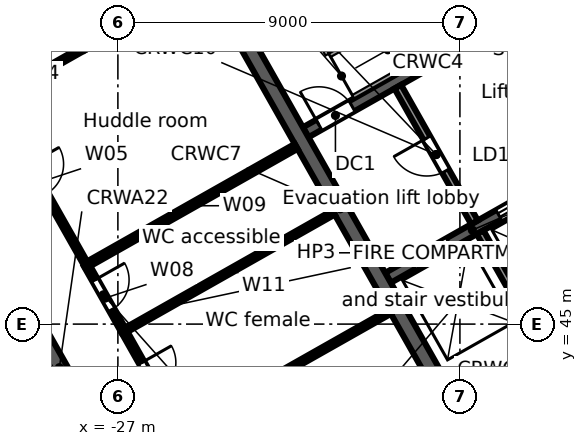
"""IFC4 building model, lengths in metres.
Left out: names, types, materials, properties, quantities, classifications, styles, units other than length and angle.
Written with IfcOpenShell. Run it as: python <this file> out.ifc"""

import sys

from ifc_helpers import new_model, si_unit, direction, frame, frame_2d, origin, place, context, subcontext, project, spatial, rectangle, extrude, element, fill, save


model = new_model("IFC4")
c1 = context("Model", 3, precision=1e-05, world=origin(), true_north=direction((0.0, 1.0)))
c2 = subcontext(c1, "Body", "Model", "MODEL_VIEW")
j1 = project(units=[si_unit("LENGTHUNIT", "METRE"), si_unit("PLANEANGLEUNIT", "RADIAN")], contexts=[c1])
p1 = place(None, origin())
s1 = spatial("IfcSite", under=j1, at=p1, CompositionType="ELEMENT")
p2 = place(p1, origin())
s2 = spatial("IfcBuilding", under=s1, at=p2, CompositionType="ELEMENT")
p3 = place(p2, frame((0.0, 0.0, 281.7)))
s3 = spatial("IfcBuildingStorey", under=s2, at=p3, CompositionType="ELEMENT", Elevation=281.7)
p4 = place(p3, frame((-58.732, 38.771, 0.0), z_axis=(0.0, 0.0, 1.0), x_axis=(0.870355615581, 0.492423702137, 0.0)))
e1 = element("IfcWall", 1, at=p4, inside=s3, PredefinedType="STANDARD", context=c2, shape_type="SweptSolid", body=[
    extrude(rectangle(XDim=64.052, YDim=0.25, at=frame_2d((32.026, 0.0))), origin(), (0.0, 0.0, 1.0), 3.45),
])
p5 = place(p4, frame((61.259, 0.0, 0.8)))
e2 = element("IfcOpeningElement", 2, at=p5, cuts=e1, PredefinedType="OPENING", context=c2, shape_type="SweptSolid", body=[
    extrude(rectangle(XDim=2.4, YDim=2.2, at=frame_2d((1.2, 1.1))), frame((0.0, 0.135, 0.0), z_axis=(0.0, -1.0, 0.0), x_axis=(1.0, 0.0, 0.0)), (0.0, 0.0, 1.0), 0.27),
])
p6 = place(p4, frame((58.216, 0.0, 0.8)))
e3 = element("IfcOpeningElement", 3, at=p6, cuts=e1, PredefinedType="OPENING", context=c2, shape_type="SweptSolid", body=[
    extrude(rectangle(XDim=2.4, YDim=2.2, at=frame_2d((1.2, 1.1))), frame((0.0, 0.135, 0.0), z_axis=(0.0, -1.0, 0.0), x_axis=(1.0, 0.0, 0.0)), (0.0, 0.0, 1.0), 0.27),
])
p7 = place(p4, frame((55.173, 0.0, 0.8)))
e4 = element("IfcOpeningElement", 4, at=p7, cuts=e1, PredefinedType="OPENING", context=c2, shape_type="SweptSolid", body=[
    extrude(rectangle(XDim=2.4, YDim=2.2, at=frame_2d((1.2, 1.1))), frame((0.0, 0.135, 0.0), z_axis=(0.0, -1.0, 0.0), x_axis=(1.0, 0.0, 0.0)), (0.0, 0.0, 1.0), 0.27),
])
p8 = place(p4, frame((52.129, 0.0, 0.8)))
e5 = element("IfcOpeningElement", 5, at=p8, cuts=e1, PredefinedType="OPENING", context=c2, shape_type="SweptSolid", body=[
    extrude(rectangle(XDim=2.4, YDim=2.2, at=frame_2d((1.2, 1.1))), frame((0.0, 0.135, 0.0), z_axis=(0.0, -1.0, 0.0), x_axis=(1.0, 0.0, 0.0)), (0.0, 0.0, 1.0), 0.27),
])
p9 = place(p4, frame((49.086, 0.0, 0.8)))
e6 = element("IfcOpeningElement", 6, at=p9, cuts=e1, PredefinedType="OPENING", context=c2, shape_type="SweptSolid", body=[
    extrude(rectangle(XDim=2.4, YDim=2.2, at=frame_2d((1.2, 1.1))), frame((0.0, 0.135, 0.0), z_axis=(0.0, -1.0, 0.0), x_axis=(1.0, 0.0, 0.0)), (0.0, 0.0, 1.0), 0.27),
])
p10 = place(p4, frame((46.043, 0.0, 0.8)))
e7 = element("IfcOpeningElement", 7, at=p10, cuts=e1, PredefinedType="OPENING", context=c2, shape_type="SweptSolid", body=[
    extrude(rectangle(XDim=2.4, YDim=2.2, at=frame_2d((1.2, 1.1))), frame((0.0, 0.135, 0.0), z_axis=(0.0, -1.0, 0.0), x_axis=(1.0, 0.0, 0.0)), (0.0, 0.0, 1.0), 0.27),
])
p11 = place(p4, frame((43.0, 0.0, 0.8)))
e8 = element("IfcOpeningElement", 8, at=p11, cuts=e1, PredefinedType="OPENING", context=c2, shape_type="SweptSolid", body=[
    extrude(rectangle(XDim=2.4, YDim=2.2, at=frame_2d((1.2, 1.1))), frame((0.0, 0.135, 0.0), z_axis=(0.0, -1.0, 0.0), x_axis=(1.0, 0.0, 0.0)), (0.0, 0.0, 1.0), 0.27),
])
p12 = place(p4, frame((39.956, 0.0, 0.8)))
e9 = element("IfcOpeningElement", 9, at=p12, cuts=e1, PredefinedType="OPENING", context=c2, shape_type="SweptSolid", body=[
    extrude(rectangle(XDim=2.4, YDim=2.2, at=frame_2d((1.2, 1.1))), frame((0.0, 0.135, 0.0), z_axis=(0.0, -1.0, 0.0), x_axis=(1.0, 0.0, 0.0)), (0.0, 0.0, 1.0), 0.27),
])
p13 = place(p4, frame((36.913, 0.0, 0.8)))
e10 = element("IfcOpeningElement", 10, at=p13, cuts=e1, PredefinedType="OPENING", context=c2, shape_type="SweptSolid", body=[
    extrude(rectangle(XDim=2.4, YDim=2.2, at=frame_2d((1.2, 1.1))), frame((0.0, 0.135, 0.0), z_axis=(0.0, -1.0, 0.0), x_axis=(1.0, 0.0, 0.0)), (0.0, 0.0, 1.0), 0.27),
])
p14 = place(p4, frame((33.87, 0.0, 0.8)))
e11 = element("IfcOpeningElement", 11, at=p14, cuts=e1, PredefinedType="OPENING", context=c2, shape_type="SweptSolid", body=[
    extrude(rectangle(XDim=2.4, YDim=2.2, at=frame_2d((1.2, 1.1))), frame((0.0, 0.135, 0.0), z_axis=(0.0, -1.0, 0.0), x_axis=(1.0, 0.0, 0.0)), (0.0, 0.0, 1.0), 0.27),
])
p15 = place(p4, frame((30.826, 0.0, 0.8)))
e12 = element("IfcOpeningElement", 12, at=p15, cuts=e1, PredefinedType="OPENING", context=c2, shape_type="SweptSolid", body=[
    extrude(rectangle(XDim=2.4, YDim=2.2, at=frame_2d((1.2, 1.1))), frame((0.0, 0.135, 0.0), z_axis=(0.0, -1.0, 0.0), x_axis=(1.0, 0.0, 0.0)), (0.0, 0.0, 1.0), 0.27),
])
p16 = place(p4, frame((27.783, 0.0, 0.8)))
e13 = element("IfcOpeningElement", 13, at=p16, cuts=e1, PredefinedType="OPENING", context=c2, shape_type="SweptSolid", body=[
    extrude(rectangle(XDim=2.4, YDim=2.2, at=frame_2d((1.2, 1.1))), frame((0.0, 0.135, 0.0), z_axis=(0.0, -1.0, 0.0), x_axis=(1.0, 0.0, 0.0)), (0.0, 0.0, 1.0), 0.27),
])
p17 = place(p4, frame((24.74, 0.0, 0.8)))
e14 = element("IfcOpeningElement", 14, at=p17, cuts=e1, PredefinedType="OPENING", context=c2, shape_type="SweptSolid", body=[
    extrude(rectangle(XDim=2.4, YDim=2.2, at=frame_2d((1.2, 1.1))), frame((0.0, 0.135, 0.0), z_axis=(0.0, -1.0, 0.0), x_axis=(1.0, 0.0, 0.0)), (0.0, 0.0, 1.0), 0.27),
])
p18 = place(p4, frame((21.696, 0.0, 0.8)))
e15 = element("IfcOpeningElement", 15, at=p18, cuts=e1, PredefinedType="OPENING", context=c2, shape_type="SweptSolid", body=[
    extrude(rectangle(XDim=2.4, YDim=2.2, at=frame_2d((1.2, 1.1))), frame((0.0, 0.135, 0.0), z_axis=(0.0, -1.0, 0.0), x_axis=(1.0, 0.0, 0.0)), (0.0, 0.0, 1.0), 0.27),
])
p19 = place(p4, frame((18.653, 0.0, 0.8)))
e16 = element("IfcOpeningElement", 16, at=p19, cuts=e1, PredefinedType="OPENING", context=c2, shape_type="SweptSolid", body=[
    extrude(rectangle(XDim=2.4, YDim=2.2, at=frame_2d((1.2, 1.1))), frame((0.0, 0.135, 0.0), z_axis=(0.0, -1.0, 0.0), x_axis=(1.0, 0.0, 0.0)), (0.0, 0.0, 1.0), 0.27),
])
p20 = place(p4, frame((15.61, 0.0, 0.8)))
e17 = element("IfcOpeningElement", 17, at=p20, cuts=e1, PredefinedType="OPENING", context=c2, shape_type="SweptSolid", body=[
    extrude(rectangle(XDim=2.4, YDim=2.2, at=frame_2d((1.2, 1.1))), frame((0.0, 0.135, 0.0), z_axis=(0.0, -1.0, 0.0), x_axis=(1.0, 0.0, 0.0)), (0.0, 0.0, 1.0), 0.27),
])
p21 = place(p4, frame((12.567, 0.0, 0.8)))
e18 = element("IfcOpeningElement", 18, at=p21, cuts=e1, PredefinedType="OPENING", context=c2, shape_type="SweptSolid", body=[
    extrude(rectangle(XDim=2.4, YDim=2.2, at=frame_2d((1.2, 1.1))), frame((0.0, 0.135, 0.0), z_axis=(0.0, -1.0, 0.0), x_axis=(1.0, 0.0, 0.0)), (0.0, 0.0, 1.0), 0.27),
])
p22 = place(p4, frame((9.523, 0.0, 0.8)))
e19 = element("IfcOpeningElement", 19, at=p22, cuts=e1, PredefinedType="OPENING", context=c2, shape_type="SweptSolid", body=[
    extrude(rectangle(XDim=2.4, YDim=2.2, at=frame_2d((1.2, 1.1))), frame((0.0, 0.135, 0.0), z_axis=(0.0, -1.0, 0.0), x_axis=(1.0, 0.0, 0.0)), (0.0, 0.0, 1.0), 0.27),
])
p23 = place(p4, frame((6.48, 0.0, 0.8)))
e20 = element("IfcOpeningElement", 20, at=p23, cuts=e1, PredefinedType="OPENING", context=c2, shape_type="SweptSolid", body=[
    extrude(rectangle(XDim=2.4, YDim=2.2, at=frame_2d((1.2, 1.1))), frame((0.0, 0.135, 0.0), z_axis=(0.0, -1.0, 0.0), x_axis=(1.0, 0.0, 0.0)), (0.0, 0.0, 1.0), 0.27),
])
p24 = place(p4, frame((3.437, 0.0, 0.8)))
e21 = element("IfcOpeningElement", 21, at=p24, cuts=e1, PredefinedType="OPENING", context=c2, shape_type="SweptSolid", body=[
    extrude(rectangle(XDim=2.4, YDim=2.2, at=frame_2d((1.2, 1.1))), frame((0.0, 0.135, 0.0), z_axis=(0.0, -1.0, 0.0), x_axis=(1.0, 0.0, 0.0)), (0.0, 0.0, 1.0), 0.27),
])
p25 = place(p4, frame((0.393, 0.0, 0.8)))
e22 = element("IfcOpeningElement", 22, at=p25, cuts=e1, PredefinedType="OPENING", context=c2, shape_type="SweptSolid", body=[
    extrude(rectangle(XDim=2.4, YDim=2.2, at=frame_2d((1.2, 1.1))), frame((0.0, 0.135, 0.0), z_axis=(0.0, -1.0, 0.0), x_axis=(1.0, 0.0, 0.0)), (0.0, 0.0, 1.0), 0.27),
])
p26 = place(p3, frame((-3.017, 46.293, 0.0), z_axis=(0.0, 0.0, 1.0), x_axis=(-0.870355474887, -0.492423950812, 0.0)))
e23 = element("IfcWall", 23, at=p26, inside=s3, PredefinedType="STANDARD", context=c2, shape_type="SweptSolid", body=[
    extrude(rectangle(XDim=40.34, YDim=0.25, at=frame_2d((20.17, 0.0))), origin(), (0.0, 0.0, 1.0), 3.45),
])
p27 = place(p26, frame((37.428, 0.0, 0.8)))
e24 = element("IfcOpeningElement", 24, at=p27, cuts=e23, PredefinedType="OPENING", context=c2, shape_type="SweptSolid", body=[
    extrude(rectangle(XDim=2.4, YDim=2.2, at=frame_2d((1.2, 1.1))), frame((0.0, 0.135, 0.0), z_axis=(0.0, -1.0, 0.0), x_axis=(1.0, 0.0, 0.0)), (0.0, 0.0, 1.0), 0.27),
])
p28 = place(p26, frame((34.372, 0.0, 0.0)))
e25 = element("IfcOpeningElement", 25, at=p28, cuts=e23, PredefinedType="OPENING", context=c2, shape_type="SweptSolid", body=[
    extrude(rectangle(XDim=1.8, YDim=2.4, at=frame_2d((0.9, 1.2))), frame((0.0, 0.135, 0.0), z_axis=(0.0, -1.0, 0.0), x_axis=(1.0, 0.0, 0.0)), (0.0, 0.0, 1.0), 0.27),
])
p29 = place(p26, frame((30.716, 0.0, 0.8)))
e26 = element("IfcOpeningElement", 26, at=p29, cuts=e23, PredefinedType="OPENING", context=c2, shape_type="SweptSolid", body=[
    extrude(rectangle(XDim=2.4, YDim=2.2, at=frame_2d((1.2, 1.1))), frame((0.0, 0.135, 0.0), z_axis=(0.0, -1.0, 0.0), x_axis=(1.0, 0.0, 0.0)), (0.0, 0.0, 1.0), 0.27),
])
p30 = place(p26, frame((27.36, 0.0, 0.8)))
e27 = element("IfcOpeningElement", 27, at=p30, cuts=e23, PredefinedType="OPENING", context=c2, shape_type="SweptSolid", body=[
    extrude(rectangle(XDim=2.4, YDim=2.2, at=frame_2d((1.2, 1.1))), frame((0.0, 0.135, 0.0), z_axis=(0.0, -1.0, 0.0), x_axis=(1.0, 0.0, 0.0)), (0.0, 0.0, 1.0), 0.27),
])
p31 = place(p26, frame((24.304, 0.0, 0.0)))
e28 = element("IfcOpeningElement", 28, at=p31, cuts=e23, PredefinedType="OPENING", context=c2, shape_type="SweptSolid", body=[
    extrude(rectangle(XDim=1.8, YDim=2.4, at=frame_2d((0.9, 1.2))), frame((0.0, 0.135, 0.0), z_axis=(0.0, -1.0, 0.0), x_axis=(1.0, 0.0, 0.0)), (0.0, 0.0, 1.0), 0.27),
])
p32 = place(p26, frame((20.648, 0.0, 0.8)))
e29 = element("IfcOpeningElement", 29, at=p32, cuts=e23, PredefinedType="OPENING", context=c2, shape_type="SweptSolid", body=[
    extrude(rectangle(XDim=2.4, YDim=2.2, at=frame_2d((1.2, 1.1))), frame((0.0, 0.135, 0.0), z_axis=(0.0, -1.0, 0.0), x_axis=(1.0, 0.0, 0.0)), (0.0, 0.0, 1.0), 0.27),
])
p33 = place(p26, frame((17.292, 0.0, 0.8)))
e30 = element("IfcOpeningElement", 30, at=p33, cuts=e23, PredefinedType="OPENING", context=c2, shape_type="SweptSolid", body=[
    extrude(rectangle(XDim=2.4, YDim=2.2, at=frame_2d((1.2, 1.1))), frame((0.0, 0.135, 0.0), z_axis=(0.0, -1.0, 0.0), x_axis=(1.0, 0.0, 0.0)), (0.0, 0.0, 1.0), 0.27),
])
p34 = place(p26, frame((14.236, 0.0, 0.0)))
e31 = element("IfcOpeningElement", 31, at=p34, cuts=e23, PredefinedType="OPENING", context=c2, shape_type="SweptSolid", body=[
    extrude(rectangle(XDim=1.8, YDim=2.4, at=frame_2d((0.9, 1.2))), frame((0.0, 0.135, 0.0), z_axis=(0.0, -1.0, 0.0), x_axis=(1.0, 0.0, 0.0)), (0.0, 0.0, 1.0), 0.27),
])
p35 = place(p26, frame((10.58, 0.0, 0.8)))
e32 = element("IfcOpeningElement", 32, at=p35, cuts=e23, PredefinedType="OPENING", context=c2, shape_type="SweptSolid", body=[
    extrude(rectangle(XDim=2.4, YDim=2.2, at=frame_2d((1.2, 1.1))), frame((0.0, 0.135, 0.0), z_axis=(0.0, -1.0, 0.0), x_axis=(1.0, 0.0, 0.0)), (0.0, 0.0, 1.0), 0.27),
])
p36 = place(p26, frame((7.224, 0.0, 0.8)))
e33 = element("IfcOpeningElement", 33, at=p36, cuts=e23, PredefinedType="OPENING", context=c2, shape_type="SweptSolid", body=[
    extrude(rectangle(XDim=2.4, YDim=2.2, at=frame_2d((1.2, 1.1))), frame((0.0, 0.135, 0.0), z_axis=(0.0, -1.0, 0.0), x_axis=(1.0, 0.0, 0.0)), (0.0, 0.0, 1.0), 0.27),
])
p37 = place(p26, frame((4.168, 0.0, 0.0)))
e34 = element("IfcOpeningElement", 34, at=p37, cuts=e23, PredefinedType="OPENING", context=c2, shape_type="SweptSolid", body=[
    extrude(rectangle(XDim=1.8, YDim=2.4, at=frame_2d((0.9, 1.2))), frame((0.0, 0.135, 0.0), z_axis=(0.0, -1.0, 0.0), x_axis=(1.0, 0.0, 0.0)), (0.0, 0.0, 1.0), 0.27),
])
p38 = place(p26, frame((0.512, 0.0, 0.8)))
e35 = element("IfcOpeningElement", 35, at=p38, cuts=e23, PredefinedType="OPENING", context=c2, shape_type="SweptSolid", body=[
    extrude(rectangle(XDim=2.4, YDim=2.2, at=frame_2d((1.2, 1.1))), frame((0.0, 0.135, 0.0), z_axis=(0.0, -1.0, 0.0), x_axis=(1.0, 0.0, 0.0)), (0.0, 0.0, 1.0), 0.27),
])
p39 = place(p3, frame((-31.79, 49.597, 0.0), z_axis=(0.0, 0.0, 1.0), x_axis=(0.492421663121, -0.870356769198, 0.0)))
e36 = element("IfcWall", 36, at=p39, inside=s3, PredefinedType="SOLIDWALL", context=c2, shape_type="SweptSolid", body=[
    extrude(rectangle(XDim=13.2, YDim=0.4, at=frame_2d((6.6, 0.0))), origin(), (0.0, 0.0, 1.0), 3.45),
])
p40 = place(p3, frame((-17.975, 42.017, 0.0), z_axis=(0.0, 0.0, 1.0), x_axis=(0.87034965173, 0.492434243055, 0.0)))
e37 = element("IfcWall", 37, at=p40, inside=s3, PredefinedType="SOLIDWALL", context=c2, shape_type="SweptSolid", body=[
    extrude(rectangle(XDim=15.0, YDim=0.4, at=frame_2d((7.5, 0.0))), origin(), (0.0, 0.0, 1.0), 3.45),
])
p41 = place(p40, frame((6.1, 0.0, 0.0)))
e38 = element("IfcOpeningElement", 38, at=p41, cuts=e37, PredefinedType="OPENING", context=c2, shape_type="SweptSolid", body=[
    extrude(rectangle(XDim=1.2, YDim=2.1, at=frame_2d((0.6, 1.05))), frame((0.0, 0.21, 0.0), z_axis=(0.0, -1.0, 0.0), x_axis=(1.0, 0.0, 0.0)), (0.0, 0.0, 1.0), 0.42),
])
p42 = place(p3, frame((-19.892, 46.218, 0.0), z_axis=(0.0, 0.0, 1.0), x_axis=(0.870341639186, 0.492448404505, 0.0)))
e39 = element("IfcWall", 39, at=p42, inside=s3, PredefinedType="SOLIDWALL", context=c2, shape_type="SweptSolid", body=[
    extrude(rectangle(XDim=5.1, YDim=0.3, at=frame_2d((2.55, 0.0))), origin(), (0.0, 0.0, 1.0), 3.45),
])
p43 = place(p42, frame((0.75, 0.0, 0.0)))
e40 = element("IfcOpeningElement", 40, at=p43, cuts=e39, PredefinedType="OPENING", context=c2, shape_type="SweptSolid", body=[
    extrude(rectangle(XDim=1.1, YDim=2.1, at=frame_2d((0.55, 1.05))), frame((0.0, 0.16, 0.0), z_axis=(0.0, -1.0, 0.0), x_axis=(1.0, 0.0, 0.0)), (0.0, 0.0, 1.0), 0.32),
])
p44 = place(p42, frame((3.35, 0.0, 0.0)))
e41 = element("IfcOpeningElement", 41, at=p44, cuts=e39, PredefinedType="OPENING", context=c2, shape_type="SweptSolid", body=[
    extrude(rectangle(XDim=1.1, YDim=2.1, at=frame_2d((0.55, 1.05))), frame((0.0, 0.16, 0.0), z_axis=(0.0, -1.0, 0.0), x_axis=(1.0, 0.0, 0.0)), (0.0, 0.0, 1.0), 0.32),
])
p45 = place(p3, frame((-22.059, 50.047, 0.0), z_axis=(0.0, 0.0, 1.0), x_axis=(0.87035077051, 0.49243226567, 0.0)))
e42 = element("IfcWall", 42, at=p45, inside=s3, PredefinedType="SOLIDWALL", context=c2, shape_type="SweptSolid", body=[
    extrude(rectangle(XDim=7.4, YDim=0.3, at=frame_2d((3.7, 0.0))), origin(), (0.0, 0.0, 1.0), 3.45),
])
p46 = place(p45, frame((0.4, 0.0, 0.0)))
e43 = element("IfcOpeningElement", 43, at=p46, cuts=e42, PredefinedType="OPENING", context=c2, shape_type="SweptSolid", body=[
    extrude(rectangle(XDim=1.0, YDim=2.1, at=frame_2d((0.5, 1.05))), frame((0.0, 0.16, 0.0), z_axis=(0.0, -1.0, 0.0), x_axis=(1.0, 0.0, 0.0)), (0.0, 0.0, 1.0), 0.32),
])
p47 = place(p3, frame((-24.4, 53.779, 0.0), z_axis=(0.0, 0.0, 1.0), x_axis=(0.492421663121, -0.870356769198, 0.0)))
e44 = element("IfcWall", 44, at=p47, inside=s3, PredefinedType="SOLIDWALL", context=c2, shape_type="SweptSolid", body=[
    extrude(rectangle(XDim=13.2, YDim=0.4, at=frame_2d((6.6, 0.0))), origin(), (0.0, 0.0, 1.0), 3.45),
])
p48 = place(p3, frame((-17.469, 47.417, 0.0), z_axis=(0.0, 0.0, 1.0), x_axis=(0.492466057713, -0.870331650579, 0.0)))
e45 = element("IfcWall", 45, at=p48, inside=s3, PredefinedType="SOLIDWALL", context=c2, shape_type="SweptSolid", body=[
    extrude(rectangle(XDim=4.25, YDim=0.2, at=frame_2d((2.125, 0.0))), origin(), (0.0, 0.0, 1.0), 3.45),
])
p49 = place(p3, frame((-19.635, 51.246, 0.0), z_axis=(0.0, 0.0, 1.0), x_axis=(0.492408451753, -0.87036424366, 0.0)))
e46 = element("IfcWall", 46, at=p49, inside=s3, PredefinedType="PARTITIONING", context=c2, shape_type="SweptSolid", body=[
    extrude(rectangle(XDim=4.1, YDim=0.2, at=frame_2d((2.05, 0.0))), origin(), (0.0, 0.0, 1.0), 3.45),
])
p50 = place(p49, frame((1.55, 0.0, 0.0)))
e47 = element("IfcOpeningElement", 47, at=p50, cuts=e46, PredefinedType="OPENING", context=c2, shape_type="SweptSolid", body=[
    extrude(rectangle(XDim=1.0, YDim=2.1, at=frame_2d((0.5, 1.05))), frame((0.0, 0.11, 0.0), z_axis=(0.0, -1.0, 0.0), x_axis=(1.0, 0.0, 0.0)), (0.0, 0.0, 1.0), 0.22),
])
p51 = place(p3, frame((-30.289, 50.906, 0.0), z_axis=(0.0, 0.0, 1.0), x_axis=(0.870344460795, 0.492443417626, 0.0)))
e48 = element("IfcWall", 48, at=p51, inside=s3, PredefinedType="PARTITIONING", context=c2, shape_type="SweptSolid", body=[
    extrude(rectangle(XDim=2.75, YDim=0.125, at=frame_2d((1.375, 0.0))), origin(), (0.0, 0.0, 1.0), 3.45),
])
p52 = place(p3, frame((-30.289, 50.906, 0.0), z_axis=(0.0, 0.0, 1.0), x_axis=(0.492406341242, -0.870365437678, 0.0)))
e49 = element("IfcWall", 49, at=p52, inside=s3, PredefinedType="PARTITIONING", context=c2, shape_type="SweptSolid", body=[
    extrude(rectangle(XDim=5.0, YDim=0.125, at=frame_2d((2.5, 0.0))), origin(), (0.0, 0.0, 1.0), 3.45),
])
p53 = place(p52, frame((1.95, 0.0, 0.0)))
e50 = element("IfcOpeningElement", 50, at=p53, cuts=e49, PredefinedType="OPENING", context=c2, shape_type="SweptSolid", body=[
    extrude(rectangle(XDim=0.9, YDim=2.1, at=frame_2d((0.45, 1.05))), frame((0.0, 0.073, 0.0), z_axis=(0.0, -1.0, 0.0), x_axis=(1.0, 0.0, 0.0)), (0.0, 0.0, 1.0), 0.145),
])
p54 = place(p3, frame((-27.827, 46.554, 0.0), z_axis=(0.0, 0.0, 1.0), x_axis=(0.492374954878, -0.870383193662, 0.0)))
e51 = element("IfcWall", 51, at=p54, inside=s3, PredefinedType="PARTITIONING", context=c2, shape_type="SweptSolid", body=[
    extrude(rectangle(XDim=2.0, YDim=0.15, at=frame_2d((1.0, 0.0))), origin(), (0.0, 0.0, 1.0), 2.622),
])
p55 = place(p54, frame((0.45, 0.0, 0.0)))
e52 = element("IfcOpeningElement", 52, at=p55, cuts=e51, PredefinedType="OPENING", context=c2, shape_type="SweptSolid", body=[
    extrude(rectangle(XDim=0.9, YDim=2.1, at=frame_2d((0.45, 1.05))), frame((0.0, 0.085, 0.0), z_axis=(0.0, -1.0, 0.0), x_axis=(1.0, 0.0, 0.0)), (0.0, 0.0, 1.0), 0.17),
])
p56 = place(p3, frame((-27.827, 46.554, 0.0), z_axis=(0.0, 0.0, 1.0), x_axis=(0.870339695563, 0.492451839602, 0.0)))
e53 = element("IfcWall", 53, at=p56, inside=s3, PredefinedType="PARTITIONING", context=c2, shape_type="SweptSolid", body=[
    extrude(rectangle(XDim=6.34, YDim=0.15, at=frame_2d((3.17, 0.0))), origin(), (0.0, 0.0, 1.0), 2.622),
])
p57 = place(p3, frame((-26.842, 44.813, 0.0), z_axis=(0.0, 0.0, 1.0), x_axis=(0.492365617434, -0.870388475779, 0.0)))
e54 = element("IfcWall", 54, at=p57, inside=s3, PredefinedType="PARTITIONING", context=c2, shape_type="SweptSolid", body=[
    extrude(rectangle(XDim=3.0, YDim=0.15, at=frame_2d((1.5, 0.0))), origin(), (0.0, 0.0, 1.0), 2.622),
])
p58 = place(p57, frame((0.95, 0.0, 0.0)))
e55 = element("IfcOpeningElement", 55, at=p58, cuts=e54, PredefinedType="OPENING", context=c2, shape_type="SweptSolid", body=[
    extrude(rectangle(XDim=0.9, YDim=2.1, at=frame_2d((0.45, 1.05))), frame((0.0, 0.085, 0.0), z_axis=(0.0, -1.0, 0.0), x_axis=(1.0, 0.0, 0.0)), (0.0, 0.0, 1.0), 0.17),
])
p59 = place(p3, frame((-26.842, 44.813, 0.0), z_axis=(0.0, 0.0, 1.0), x_axis=(0.870283015025, 0.492552001071, 0.0)))
e56 = element("IfcWall", 56, at=p59, inside=s3, PredefinedType="PARTITIONING", context=c2, shape_type="SweptSolid", body=[
    extrude(rectangle(XDim=6.341, YDim=0.125, at=frame_2d((3.17, 0.0))), origin(), (0.0, 0.0, 1.0), 2.622),
])
p60 = place(p3, frame((-25.365, 42.202, 0.0), z_axis=(0.0, 0.0, 1.0), x_axis=(0.870320373616, 0.492485986875, 0.0)))
e57 = element("IfcWall", 57, at=p60, inside=s3, PredefinedType="PARTITIONING", context=c2, shape_type="SweptSolid", body=[
    extrude(rectangle(XDim=6.341, YDim=0.125, at=frame_2d((3.171, 0.0))), origin(), (0.0, 0.0, 1.0), 3.45),
])
p61 = place(p43, origin())
e58 = element("IfcDoor", 58, at=p61, inside=s3, OperationType="DOUBLE_DOOR_SLIDING", PredefinedType="DOOR", context=c2, shape_type="SweptSolid", body=[
    extrude(rectangle(XDim=1.1, YDim=2.1, at=frame_2d((0.55, 1.05))), frame((0.0, 0.025, 0.0), z_axis=(0.0, -1.0, 0.0), x_axis=(1.0, 0.0, 0.0)), (0.0, 0.0, 1.0), 0.05),
])
fill(e40, e58)
p62 = place(p44, origin())
e59 = element("IfcDoor", 59, at=p62, inside=s3, OperationType="DOUBLE_DOOR_SLIDING", PredefinedType="DOOR", context=c2, shape_type="SweptSolid", body=[
    extrude(rectangle(XDim=1.1, YDim=2.1, at=frame_2d((0.55, 1.05))), frame((0.0, 0.025, 0.0), z_axis=(0.0, -1.0, 0.0), x_axis=(1.0, 0.0, 0.0)), (0.0, 0.0, 1.0), 0.05),
])
fill(e41, e59)
p63 = place(p46, origin())
e60 = element("IfcDoor", 60, at=p63, inside=s3, OperationType="SINGLE_SWING_LEFT", PredefinedType="DOOR", context=c2, shape_type="SweptSolid", body=[
    extrude(rectangle(XDim=1.0, YDim=2.1, at=frame_2d((0.5, 1.05))), frame((0.0, 0.025, 0.0), z_axis=(0.0, -1.0, 0.0), x_axis=(1.0, 0.0, 0.0)), (0.0, 0.0, 1.0), 0.05),
])
fill(e43, e60)
p64 = place(p50, frame((1.0, 0.0, 0.0), z_axis=(0.0, 0.0, 1.0), x_axis=(-1.0, 0.0, 0.0)))
e61 = element("IfcDoor", 61, at=p64, inside=s3, OperationType="SINGLE_SWING_RIGHT", PredefinedType="DOOR", context=c2, shape_type="SweptSolid", body=[
    extrude(rectangle(XDim=1.0, YDim=2.1, at=frame_2d((0.5, 1.05))), frame((0.0, 0.025, 0.0), z_axis=(0.0, -1.0, 0.0), x_axis=(1.0, 0.0, 0.0)), (0.0, 0.0, 1.0), 0.05),
])
fill(e47, e61)
p65 = place(p58, origin())
e62 = element("IfcDoor", 62, at=p65, inside=s3, OperationType="SINGLE_SWING_LEFT", PredefinedType="DOOR", context=c2, shape_type="SweptSolid", body=[
    extrude(rectangle(XDim=0.9, YDim=2.1, at=frame_2d((0.45, 1.05))), frame((0.0, 0.025, 0.0), z_axis=(0.0, -1.0, 0.0), x_axis=(1.0, 0.0, 0.0)), (0.0, 0.0, 1.0), 0.05),
])
fill(e55, e62)
p66 = place(p55, origin())
e63 = element("IfcDoor", 63, at=p66, inside=s3, OperationType="SINGLE_SWING_LEFT", PredefinedType="DOOR", context=c2, shape_type="SweptSolid", body=[
    extrude(rectangle(XDim=0.9, YDim=2.1, at=frame_2d((0.45, 1.05))), frame((0.0, 0.025, 0.0), z_axis=(0.0, -1.0, 0.0), x_axis=(1.0, 0.0, 0.0)), (0.0, 0.0, 1.0), 0.05),
])
fill(e52, e63)
save(model, sys.argv[1])
